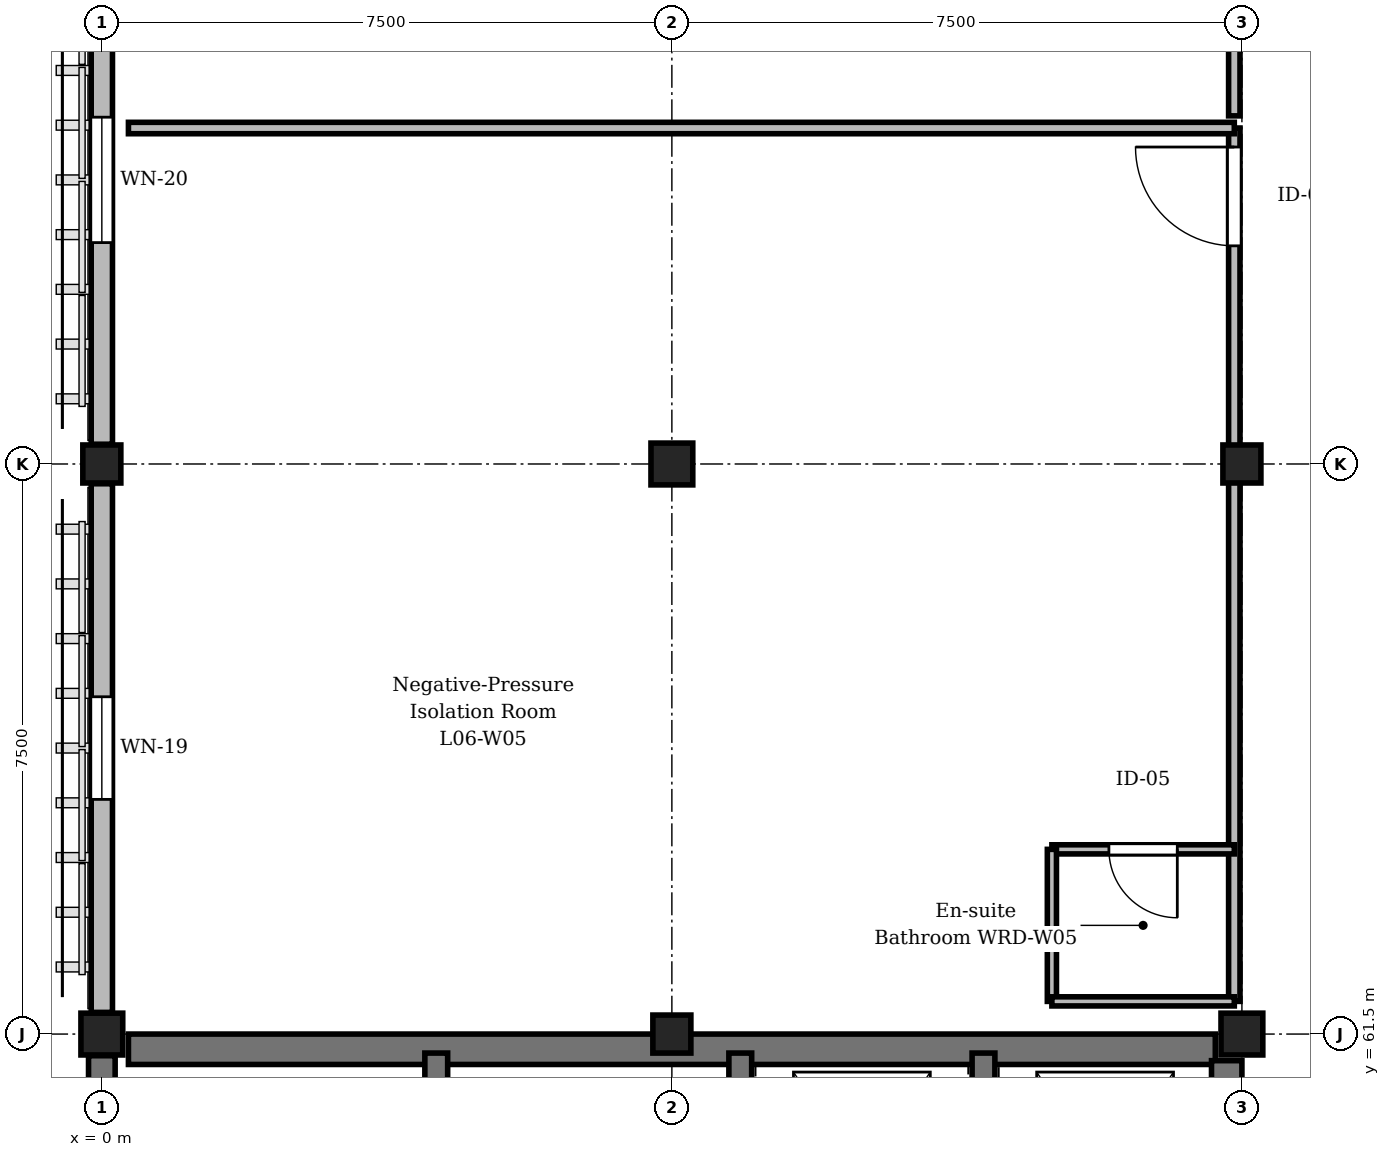
"""IFC4 building model, lengths in metres.
Left out: names, types, materials, properties, quantities, classifications, styles, units other than length and angle.
Written with IfcOpenShell. Run it as: python <this file> out.ifc"""

import sys

from ifc_helpers import new_model, si_unit, direction, frame, frame_2d, origin, origin_2d, place, context, subcontext, project, spatial, rectangle, extrude, element, fill, save


model = new_model("IFC4")
c1 = context("Model", 3, precision=1e-05, world=origin(), true_north=direction((0.0, 1.0)))
c2 = subcontext(c1, "Body", "Model", "MODEL_VIEW")
j1 = project(units=[si_unit("LENGTHUNIT", "METRE"), si_unit("PLANEANGLEUNIT", "RADIAN")], contexts=[c1])
p1 = place(None, origin())
s1 = spatial("IfcSite", under=j1, at=p1, CompositionType="ELEMENT")
p2 = place(p1, origin())
s2 = spatial("IfcBuilding", under=s1, at=p2, CompositionType="ELEMENT")
p3 = place(p2, frame((0.0, 0.0, 25.95)))
s3 = spatial("IfcBuildingStorey", under=s2, at=p3, CompositionType="ELEMENT", Elevation=25.95)
p4 = place(p3, frame((0.0, 61.5, 0.0), z_axis=(0.0, 0.0, 1.0), x_axis=(1.0, 0.0, 0.0)))
e1 = element("IfcColumn", 1, at=p4, inside=s3, PredefinedType="COLUMN", context=c2, shape_type="SweptSolid", body=[
    extrude(rectangle(XDim=0.55, YDim=0.55, at=origin_2d()), origin(), (0.0, 0.0, 1.0), 4.05),
])
for number, where, z_axis, x_axis in (
    (2, (0.0, 69.0, 0.0), (0.0, 0.0, 1.0), (1.0, 0.0, 0.0)),
    (3, (7.5, 61.5, 0.0), (0.0, 0.0, 1.0), (1.0, 0.0, 0.0)),
):
    element("IfcColumn", number, at=place(p3, frame(where, z_axis=z_axis, x_axis=x_axis)), inside=s3, PredefinedType="COLUMN", context=c2, shape_type="SweptSolid", body=[
        extrude(rectangle(XDim=0.5, YDim=0.5, at=origin_2d()), origin(), (0.0, 0.0, 1.0), 4.05),
    ])
for number, where, z_axis, x_axis in (
    (4, (7.5, 69.0, 0.0), (0.0, 0.0, 1.0), (1.0, 0.0, 0.0)),
    (5, (15.0, 61.5, 0.0), (0.0, 0.0, 1.0), (1.0, 0.0, 0.0)),
):
    element("IfcColumn", number, at=place(p3, frame(where, z_axis=z_axis, x_axis=x_axis)), inside=s3, PredefinedType="COLUMN", context=c2, shape_type="SweptSolid", body=[
        extrude(rectangle(XDim=0.55, YDim=0.55, at=origin_2d()), origin(), (0.0, 0.0, 1.0), 4.05),
    ])
p5 = place(p3, frame((15.0, 69.0, 0.0), z_axis=(0.0, 0.0, 1.0), x_axis=(1.0, 0.0, 0.0)))
e6 = element("IfcColumn", 6, at=p5, inside=s3, PredefinedType="COLUMN", context=c2, shape_type="SweptSolid", body=[
    extrude(rectangle(XDim=0.5, YDim=0.5, at=origin_2d()), origin(), (0.0, 0.0, 1.0), 4.05),
])
p6 = place(p3, frame((0.0, 54.26, 0.0), z_axis=(0.0, 0.0, 1.0), x_axis=(0.0, 1.0, 0.0)))
e7 = element("IfcWall", 7, at=p6, inside=s3, PredefinedType="SHEAR", context=c2, shape_type="SweptSolid", body=[
    extrude(rectangle(XDim=6.955, YDim=0.35, at=frame_2d((3.478, 0.0))), origin(), (0.0, 0.0, 1.0), 3.77),
])
p7 = place(p3, frame((0.0, 61.785, 0.0), z_axis=(0.0, 0.0, 1.0), x_axis=(0.0, 1.0, 0.0)))
e8 = element("IfcWall", 8, at=p7, inside=s3, PredefinedType="STANDARD", context=c2, shape_type="SweptSolid", body=[
    extrude(rectangle(XDim=6.955, YDim=0.28, at=frame_2d((3.478, 0.0))), origin(), (0.0, 0.0, 1.0), 3.17),
])
p8 = place(p7, frame((2.802, 0.0, 0.85)))
e9 = element("IfcOpeningElement", 9, at=p8, cuts=e8, PredefinedType="OPENING", context=c2, shape_type="SweptSolid", body=[
    extrude(rectangle(XDim=1.35, YDim=2.04, at=frame_2d((0.675, 1.02))), frame((0.0, 0.15, 0.0), z_axis=(0.0, -1.0, 0.0), x_axis=(1.0, 0.0, 0.0)), (0.0, 0.0, 1.0), 0.3),
])
p9 = place(p3, frame((0.0, 69.26, 0.0), z_axis=(0.0, 0.0, 1.0), x_axis=(0.0, 1.0, 0.0)))
e10 = element("IfcWall", 10, at=p9, inside=s3, PredefinedType="STANDARD", context=c2, shape_type="SweptSolid", body=[
    extrude(rectangle(XDim=6.955, YDim=0.28, at=frame_2d((3.478, 0.0))), origin(), (0.0, 0.0, 1.0), 3.17),
])
p10 = place(p9, frame((2.653, 0.0, 0.85)))
e11 = element("IfcOpeningElement", 11, at=p10, cuts=e10, PredefinedType="OPENING", context=c2, shape_type="SweptSolid", body=[
    extrude(rectangle(XDim=1.65, YDim=2.04, at=frame_2d((0.825, 1.02))), frame((0.0, 0.15, 0.0), z_axis=(0.0, -1.0, 0.0), x_axis=(1.0, 0.0, 0.0)), (0.0, 0.0, 1.0), 0.3),
])
p11 = place(p3, frame((0.35, 61.3, 0.0), z_axis=(0.0, 0.0, 1.0), x_axis=(1.0, 0.0, 0.0)))
e12 = element("IfcWall", 12, at=p11, inside=s3, PredefinedType="SHEAR", context=c2, shape_type="SweptSolid", body=[
    extrude(rectangle(XDim=14.3, YDim=0.4, at=frame_2d((7.15, 0.0))), origin(), (0.0, 0.0, 1.0), 3.77),
])
p12 = place(p3, frame((14.8, 58.1, 0.0), z_axis=(0.0, 0.0, 1.0), x_axis=(0.0, 1.0, 0.0)))
e13 = element("IfcWall", 13, at=p12, inside=s3, PredefinedType="SHEAR", context=c2, shape_type="SweptSolid", body=[
    extrude(rectangle(XDim=3.05, YDim=0.4, at=frame_2d((1.525, 0.0))), origin(), (0.0, 0.0, 1.0), 3.77),
])
for number, where, z_axis, x_axis in (
    (14, (4.4, 58.1, 0.0), (0.0, 0.0, 1.0), (0.0, 1.0, 0.0)),
    (15, (8.4, 58.1, 0.0), (0.0, 0.0, 1.0), (0.0, 1.0, 0.0)),
    (16, (11.6, 58.1, 0.0), (0.0, 0.0, 1.0), (0.0, 1.0, 0.0)),
):
    element("IfcWall", number, at=place(p3, frame(where, z_axis=z_axis, x_axis=x_axis)), inside=s3, PredefinedType="SHEAR", context=c2, shape_type="SweptSolid", body=[
        extrude(rectangle(XDim=3.15, YDim=0.3, at=frame_2d((1.575, 0.0))), origin(), (0.0, 0.0, 1.0), 3.77),
    ])
p13 = place(p3, frame((14.9, 61.93, 0.0), z_axis=(0.0, 0.0, 1.0), x_axis=(0.0, 1.0, 0.0)))
e17 = element("IfcWall", 17, at=p13, inside=s3, PredefinedType="PARTITIONING", context=c2, shape_type="SweptSolid", body=[
    extrude(rectangle(XDim=11.49, YDim=0.15, at=frame_2d((5.745, 0.0))), origin(), (0.0, 0.0, 1.0), 3.205),
])
p14 = place(p13, frame((9.94, 0.0, 0.0)))
e18 = element("IfcOpeningElement", 18, at=p14, cuts=e17, PredefinedType="OPENING", context=c2, shape_type="SweptSolid", body=[
    extrude(rectangle(XDim=1.3, YDim=2.2, at=frame_2d((0.65, 1.1))), frame((0.0, 0.085, 0.0), z_axis=(0.0, -1.0, 0.0), x_axis=(1.0, 0.0, 0.0)), (0.0, 0.0, 1.0), 0.17),
])
p15 = place(p3, frame((14.9, 63.93, 0.0), z_axis=(0.0, 0.0, 1.0), x_axis=(-1.0, 0.0, 0.0)))
e19 = element("IfcWall", 19, at=p15, inside=s3, PredefinedType="PARTITIONING", context=c2, shape_type="SweptSolid", body=[
    extrude(rectangle(XDim=2.4, YDim=0.12, at=frame_2d((1.2, 0.0))), origin(), (0.0, 0.0, 1.0), 3.755),
])
p16 = place(p15, frame((0.75, 0.0, 0.0)))
e20 = element("IfcOpeningElement", 20, at=p16, cuts=e19, PredefinedType="OPENING", context=c2, shape_type="SweptSolid", body=[
    extrude(rectangle(XDim=0.9, YDim=2.1, at=frame_2d((0.45, 1.05))), frame((0.0, 0.07, 0.0), z_axis=(0.0, -1.0, 0.0), x_axis=(1.0, 0.0, 0.0)), (0.0, 0.0, 1.0), 0.14),
])
p17 = place(p3, frame((12.5, 61.93, 0.0), z_axis=(0.0, 0.0, 1.0), x_axis=(0.0, 1.0, 0.0)))
e21 = element("IfcWall", 21, at=p17, inside=s3, PredefinedType="PARTITIONING", context=c2, shape_type="SweptSolid", body=[
    extrude(rectangle(XDim=2.0, YDim=0.12, at=frame_2d((1.0, 0.0))), origin(), (0.0, 0.0, 1.0), 3.755),
])
p18 = place(p3, frame((14.9, 73.58, 0.0), z_axis=(0.0, 0.0, 1.0), x_axis=(0.0, 1.0, 0.0)))
e22 = element("IfcWall", 22, at=p18, inside=s3, PredefinedType="PARTITIONING", context=c2, shape_type="SweptSolid", body=[
    extrude(rectangle(XDim=11.49, YDim=0.15, at=frame_2d((5.745, 0.0))), origin(), (0.0, 0.0, 1.0), 3.055),
])
p19 = place(p18, frame((6.998, 0.0, 0.0)))
e23 = element("IfcOpeningElement", 23, at=p19, cuts=e22, PredefinedType="OPENING", context=c2, shape_type="SweptSolid", body=[
    extrude(rectangle(XDim=1.35, YDim=2.25, at=frame_2d((0.675, 1.125))), frame((0.0, 0.085, 0.0), z_axis=(0.0, -1.0, 0.0), x_axis=(1.0, 0.0, 0.0)), (0.0, 0.0, 1.0), 0.17),
])
p20 = place(p3, frame((0.35, 73.42, 0.0), z_axis=(0.0, 0.0, 1.0), x_axis=(1.0, 0.0, 0.0)))
e24 = element("IfcWall", 24, at=p20, inside=s3, PredefinedType="PARTITIONING", context=c2, shape_type="SweptSolid", body=[
    extrude(rectangle(XDim=14.55, YDim=0.15, at=frame_2d((7.275, 0.0))), origin(), (0.0, 0.0, 1.0), 3.755),
])
p21 = place(p3, frame((12.5, 61.93, 0.0), z_axis=(0.0, 0.0, 1.0), x_axis=(1.0, 0.0, 0.0)))
e25 = element("IfcWall", 25, at=p21, inside=s3, PredefinedType="PARTITIONING", context=c2, shape_type="SweptSolid", body=[
    extrude(rectangle(XDim=2.4, YDim=0.12, at=frame_2d((1.2, 0.0))), origin(), (0.0, 0.0, 1.0), 3.755),
])
p22 = place(p8, origin())
e26 = element("IfcWindow", 26, at=p22, inside=s3, PartitioningType="SINGLE_PANEL", PredefinedType="WINDOW", context=c2, shape_type="SweptSolid", body=[
    extrude(rectangle(XDim=1.35, YDim=2.04, at=frame_2d((0.675, 1.02))), frame((0.0, 0.03, 0.0), z_axis=(0.0, -1.0, 0.0), x_axis=(1.0, 0.0, 0.0)), (0.0, 0.0, 1.0), 0.06),
])
fill(e9, e26)
p23 = place(p10, origin())
e27 = element("IfcWindow", 27, at=p23, inside=s3, PartitioningType="SINGLE_PANEL", PredefinedType="WINDOW", context=c2, shape_type="SweptSolid", body=[
    extrude(rectangle(XDim=1.65, YDim=2.04, at=frame_2d((0.825, 1.02))), frame((0.0, 0.03, 0.0), z_axis=(0.0, -1.0, 0.0), x_axis=(1.0, 0.0, 0.0)), (0.0, 0.0, 1.0), 0.06),
])
fill(e11, e27)
p24 = place(p14, origin())
e28 = element("IfcDoor", 28, at=p24, inside=s3, OperationType="SINGLE_SWING_RIGHT", PredefinedType="DOOR", context=c2, shape_type="SweptSolid", body=[
    extrude(rectangle(XDim=1.3, YDim=2.2, at=frame_2d((0.65, 1.1))), frame((0.0, 0.025, 0.0), z_axis=(0.0, -1.0, 0.0), x_axis=(1.0, 0.0, 0.0)), (0.0, 0.0, 1.0), 0.05),
])
fill(e18, e28)
p25 = place(p16, origin())
e29 = element("IfcDoor", 29, at=p25, inside=s3, OperationType="SINGLE_SWING_LEFT", PredefinedType="DOOR", context=c2, shape_type="SweptSolid", body=[
    extrude(rectangle(XDim=0.9, YDim=2.1, at=frame_2d((0.45, 1.05))), frame((0.0, 0.025, 0.0), z_axis=(0.0, -1.0, 0.0), x_axis=(1.0, 0.0, 0.0)), (0.0, 0.0, 1.0), 0.05),
])
fill(e20, e29)
save(model, sys.argv[1])
